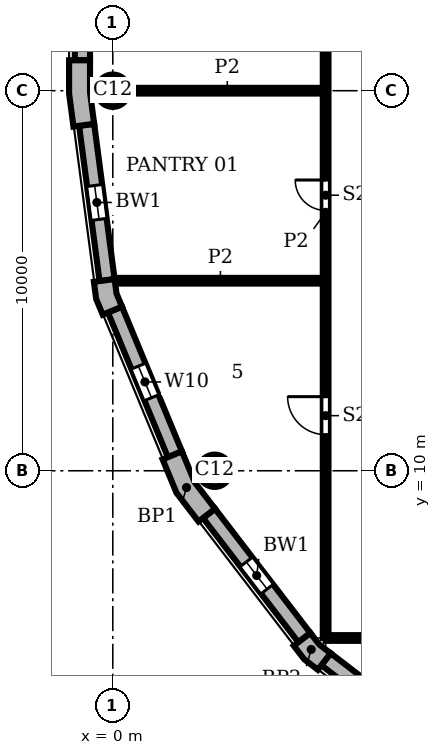
"""IFC4 building model, lengths in metres.
Left out: names, types, materials, properties, quantities, classifications, styles, units other than length and angle.
Written with IfcOpenShell. Run it as: python <this file> out.ifc"""

import sys

from ifc_helpers import new_model, si_unit, direction, frame, frame_2d, origin, origin_2d, place, context, subcontext, project, spatial, polyline, rectangle, circle, outline, extrude, element, fill, save


model = new_model("IFC4")
c1 = context("Model", 3, precision=1e-05, world=origin(), true_north=direction((0.0, 1.0)))
c2 = subcontext(c1, "Body", "Model", "MODEL_VIEW")
j1 = project(units=[si_unit("LENGTHUNIT", "METRE"), si_unit("PLANEANGLEUNIT", "RADIAN")], contexts=[c1])
p1 = place(None, origin())
s1 = spatial("IfcSite", under=j1, at=p1, CompositionType="ELEMENT")
p2 = place(p1, origin())
s2 = spatial("IfcBuilding", under=s1, at=p2, CompositionType="ELEMENT")
p3 = place(p2, frame((0.0, 0.0, 246.0)))
s3 = spatial("IfcBuildingStorey", under=s2, at=p3, CompositionType="ELEMENT", Elevation=246.0)
for number, where, z_axis, x_axis in (
    (1, (0.0, 20.0, 0.0), (0.0, 0.0, 1.0), (1.0, 0.0, 0.0)),
    (2, (2.679, 10.0, 0.0), (0.0, 0.0, 1.0), (1.0, 0.0, 0.0)),
):
    element("IfcColumn", number, at=place(p3, frame(where, z_axis=z_axis, x_axis=x_axis)), inside=s3, PredefinedType="COLUMN", context=c2, shape_type="SweptSolid", body=[
        extrude(circle(Radius=0.425, at=origin_2d()), origin(), (0.0, 0.0, 1.0), 5.4),
    ])
p4 = place(p3, origin())
e3 = element("IfcWall", 3, at=p4, inside=s3, PredefinedType="SOLIDWALL", context=c2, shape_type="SweptSolid", body=[
    extrude(outline(polyline([(-1.0, 20.8), (-1.15, 20.8), (-1.15, 19.925), (-1.036, 19.057), (-0.887, 19.076), (-0.49, 19.128), (-0.6, 19.961), (-0.6, 20.8), (-1.0, 20.8)])), origin(), (0.0, 0.0, 1.0), 5.4),
])
e4 = element("IfcWall", 4, at=p4, inside=s3, PredefinedType="SOLIDWALL", context=c2, shape_type="SweptSolid", body=[
    extrude(outline(polyline([(-0.349, 14.99), (-0.498, 14.971), (-0.439, 14.523), (-0.266, 14.106), (-0.128, 14.164), (0.242, 14.317), (0.097, 14.667), (0.047, 15.043), (-0.349, 14.99)])), origin(), (0.0, 0.0, 1.0), 5.4),
])
e5 = element("IfcWall", 5, at=p4, inside=s3, PredefinedType="SOLIDWALL", context=c2, shape_type="SweptSolid", body=[
    extrude(outline(polyline([(1.449, 10.356), (1.311, 10.299), (1.675, 9.42), (2.254, 8.665), (2.373, 8.757), (2.69, 9.0), (2.155, 9.698), (1.819, 10.51), (1.449, 10.356)])), origin(), (0.0, 0.0, 1.0), 5.4),
])
e6 = element("IfcWall", 6, at=p4, inside=s3, PredefinedType="SOLIDWALL", context=c2, shape_type="SweptSolid", body=[
    extrude(outline(polyline([(4.882, 5.487), (4.763, 5.396), (5.038, 5.038), (5.396, 4.763), (5.487, 4.882), (5.731, 5.199), (5.43, 5.43), (5.199, 5.731), (4.882, 5.487)])), origin(), (0.0, 0.0, 1.0), 5.4),
])
p5 = place(p3, frame((-0.8, 39.2, 0.0), z_axis=(0.0, 0.0, 1.0), x_axis=(0.0, -1.0, 0.0)))
e7 = element("IfcWall", 7, at=p5, inside=s3, PredefinedType="SOLIDWALL", context=c2, shape_type="SweptSolid", body=[
    extrude(rectangle(XDim=18.4, YDim=0.4, at=frame_2d((9.2, 0.0))), origin(), (0.0, 0.0, 1.0), 5.4),
])
p6 = place(p5, frame((3.75, 0.0, 0.9)))
e8 = element("IfcOpeningElement", 8, at=p6, cuts=e7, PredefinedType="OPENING", context=c2, shape_type="SweptSolid", body=[
    extrude(rectangle(XDim=0.9, YDim=3.4, at=frame_2d((0.45, 1.7))), frame((0.0, 0.21, 0.0), z_axis=(0.0, -1.0, 0.0), x_axis=(1.0, 0.0, 0.0)), (0.0, 0.0, 1.0), 0.42),
])
p7 = place(p5, frame((13.75, 0.0, 0.9)))
e9 = element("IfcOpeningElement", 9, at=p7, cuts=e7, PredefinedType="OPENING", context=c2, shape_type="SweptSolid", body=[
    extrude(rectangle(XDim=0.9, YDim=3.4, at=frame_2d((0.45, 1.7))), frame((0.0, 0.21, 0.0), z_axis=(0.0, -1.0, 0.0), x_axis=(1.0, 0.0, 0.0)), (0.0, 0.0, 1.0), 0.42),
])
p8 = place(p3, frame((-0.689, 19.102, 0.0), z_axis=(0.0, 0.0, 1.0), x_axis=(0.130514280502, -0.991446429508, 0.0)))
e10 = element("IfcWall", 10, at=p8, inside=s3, PredefinedType="SOLIDWALL", context=c2, shape_type="SweptSolid", body=[
    extrude(rectangle(XDim=4.121, YDim=0.4, at=frame_2d((2.061, 0.0))), origin(), (0.0, 0.0, 1.0), 5.4),
])
p9 = place(p8, frame((1.611, 0.0, 0.9)))
e11 = element("IfcOpeningElement", 11, at=p9, cuts=e10, PredefinedType="OPENING", context=c2, shape_type="SweptSolid", body=[
    extrude(rectangle(XDim=0.9, YDim=3.4, at=frame_2d((0.45, 1.7))), frame((0.0, 0.21, 0.0), z_axis=(0.0, -1.0, 0.0), x_axis=(1.0, 0.0, 0.0)), (0.0, 0.0, 1.0), 0.42),
])
p10 = place(p3, frame((0.057, 14.24, 0.0), z_axis=(0.0, 0.0, 1.0), x_axis=(0.382721546029, -0.923863744394, 0.0)))
e12 = element("IfcWall", 12, at=p10, inside=s3, PredefinedType="SOLIDWALL", context=c2, shape_type="SweptSolid", body=[
    extrude(rectangle(XDim=4.121, YDim=0.4, at=frame_2d((2.061, 0.0))), origin(), (0.0, 0.0, 1.0), 5.4),
])
p11 = place(p10, frame((1.611, 0.0, 0.9)))
e13 = element("IfcOpeningElement", 13, at=p11, cuts=e12, PredefinedType="OPENING", context=c2, shape_type="SweptSolid", body=[
    extrude(rectangle(XDim=0.9, YDim=3.4, at=frame_2d((0.45, 1.7))), frame((0.0, 0.21, 0.0), z_axis=(0.0, -1.0, 0.0), x_axis=(1.0, 0.0, 0.0)), (0.0, 0.0, 1.0), 0.42),
])
p12 = place(p3, frame((2.532, 8.878, 0.0), z_axis=(0.0, 0.0, 1.0), x_axis=(0.608759824817, -0.793354571229, 0.0)))
e14 = element("IfcWall", 14, at=p12, inside=s3, PredefinedType="SOLIDWALL", context=c2, shape_type="SweptSolid", body=[
    extrude(rectangle(XDim=4.121, YDim=0.4, at=frame_2d((2.061, 0.0))), origin(), (0.0, 0.0, 1.0), 5.4),
])
p13 = place(p12, frame((1.611, 0.0, 0.9)))
e15 = element("IfcOpeningElement", 15, at=p13, cuts=e14, PredefinedType="OPENING", context=c2, shape_type="SweptSolid", body=[
    extrude(rectangle(XDim=0.9, YDim=3.4, at=frame_2d((0.45, 1.7))), frame((0.0, 0.21, 0.0), z_axis=(0.0, -1.0, 0.0), x_axis=(1.0, 0.0, 0.0)), (0.0, 0.0, 1.0), 0.42),
])
p14 = place(p3, frame((5.609, 5.041, 0.0), z_axis=(0.0, 0.0, 1.0), x_axis=(0.793354571229, -0.608759824817, 0.0)))
e16 = element("IfcWall", 16, at=p14, inside=s3, PredefinedType="SOLIDWALL", context=c2, shape_type="SweptSolid", body=[
    extrude(rectangle(XDim=4.121, YDim=0.4, at=frame_2d((2.061, 0.0))), origin(), (0.0, 0.0, 1.0), 5.4),
])
p15 = place(p14, frame((1.611, 0.0, 0.9)))
e17 = element("IfcOpeningElement", 17, at=p15, cuts=e16, PredefinedType="OPENING", context=c2, shape_type="SweptSolid", body=[
    extrude(rectangle(XDim=0.9, YDim=3.4, at=frame_2d((0.45, 1.7))), frame((0.0, 0.21, 0.0), z_axis=(0.0, -1.0, 0.0), x_axis=(1.0, 0.0, 0.0)), (0.0, 0.0, 1.0), 0.42),
])
p16 = place(p3, frame((5.6, 5.6, 0.0), z_axis=(0.0, 0.0, 1.0), x_axis=(0.0, 1.0, 0.0)))
e18 = element("IfcWall", 18, at=p16, inside=s3, PredefinedType="PARTITIONING", context=c2, shape_type="SweptSolid", body=[
    extrude(rectangle(XDim=22.4, YDim=0.15, at=frame_2d((11.2, 0.0))), origin(), (0.0, 0.0, 1.0), 5.08),
])
p17 = place(p16, frame((5.35, 0.0, 0.0)))
e19 = element("IfcOpeningElement", 19, at=p17, cuts=e18, PredefinedType="OPENING", context=c2, shape_type="SweptSolid", body=[
    extrude(rectangle(XDim=1.0, YDim=2.1, at=frame_2d((0.5, 1.05))), frame((0.0, 0.085, 0.0), z_axis=(0.0, -1.0, 0.0), x_axis=(1.0, 0.0, 0.0)), (0.0, 0.0, 1.0), 0.17),
])
p18 = place(p16, frame((11.25, 0.0, 0.0)))
e20 = element("IfcOpeningElement", 20, at=p18, cuts=e18, PredefinedType="OPENING", context=c2, shape_type="SweptSolid", body=[
    extrude(rectangle(XDim=0.8, YDim=2.1, at=frame_2d((0.4, 1.05))), frame((0.0, 0.085, 0.0), z_axis=(0.0, -1.0, 0.0), x_axis=(1.0, 0.0, 0.0)), (0.0, 0.0, 1.0), 0.17),
])
p19 = place(p16, frame((18.25, 0.0, 0.0)))
e21 = element("IfcOpeningElement", 21, at=p19, cuts=e18, PredefinedType="OPENING", context=c2, shape_type="SweptSolid", body=[
    extrude(rectangle(XDim=1.8, YDim=2.1, at=frame_2d((0.9, 1.05))), frame((0.0, 0.085, 0.0), z_axis=(0.0, -1.0, 0.0), x_axis=(1.0, 0.0, 0.0)), (0.0, 0.0, 1.0), 0.17),
])
p20 = place(p3, frame((5.6, 5.6, 0.0), z_axis=(0.0, 0.0, 1.0), x_axis=(1.0, 0.0, 0.0)))
e22 = element("IfcWall", 22, at=p20, inside=s3, PredefinedType="PARTITIONING", context=c2, shape_type="SweptSolid", body=[
    extrude(rectangle(XDim=25.4, YDim=0.15, at=frame_2d((12.7, 0.0))), origin(), (0.0, 0.0, 1.0), 5.08),
])
p21 = place(p20, frame((3.6, 0.0, 0.0)))
e23 = element("IfcOpeningElement", 23, at=p21, cuts=e22, PredefinedType="OPENING", context=c2, shape_type="SweptSolid", body=[
    extrude(rectangle(XDim=1.0, YDim=2.1, at=frame_2d((0.5, 1.05))), frame((0.0, 0.085, 0.0), z_axis=(0.0, -1.0, 0.0), x_axis=(1.0, 0.0, 0.0)), (0.0, 0.0, 1.0), 0.17),
])
p22 = place(p20, frame((11.25, 0.0, 0.0)))
e24 = element("IfcOpeningElement", 24, at=p22, cuts=e22, PredefinedType="OPENING", context=c2, shape_type="SweptSolid", body=[
    extrude(rectangle(XDim=0.8, YDim=2.1, at=frame_2d((0.4, 1.05))), frame((0.0, 0.085, 0.0), z_axis=(0.0, -1.0, 0.0), x_axis=(1.0, 0.0, 0.0)), (0.0, 0.0, 1.0), 0.17),
])
p23 = place(p20, frame((18.25, 0.0, 0.0)))
e25 = element("IfcOpeningElement", 25, at=p23, cuts=e22, PredefinedType="OPENING", context=c2, shape_type="SweptSolid", body=[
    extrude(rectangle(XDim=1.0, YDim=2.1, at=frame_2d((0.5, 1.05))), frame((0.0, 0.085, 0.0), z_axis=(0.0, -1.0, 0.0), x_axis=(1.0, 0.0, 0.0)), (0.0, 0.0, 1.0), 0.17),
])
p24 = place(p3, frame((0.063, 15.0, 0.0), z_axis=(0.0, 0.0, 1.0), x_axis=(1.0, 0.0, 0.0)))
e26 = element("IfcWall", 26, at=p24, inside=s3, PredefinedType="PARTITIONING", context=c2, shape_type="SweptSolid", body=[
    extrude(rectangle(XDim=5.537, YDim=0.15, at=frame_2d((2.769, 0.0))), origin(), (0.0, 0.0, 1.0), 5.08),
])
p25 = place(p3, frame((0.425, 20.0, 0.0), z_axis=(0.0, 0.0, 1.0), x_axis=(1.0, 0.0, 0.0)))
e27 = element("IfcWall", 27, at=p25, inside=s3, PredefinedType="PARTITIONING", context=c2, shape_type="SweptSolid", body=[
    extrude(rectangle(XDim=5.175, YDim=0.15, at=frame_2d((2.587, 0.0))), origin(), (0.0, 0.0, 1.0), 5.08),
])
p26 = place(p9, origin())
e28 = element("IfcWindow", 28, at=p26, inside=s3, PartitioningType="SINGLE_PANEL", PredefinedType="WINDOW", context=c2, shape_type="SweptSolid", body=[
    extrude(rectangle(XDim=0.9, YDim=3.4, at=frame_2d((0.45, 1.7))), frame((0.0, 0.16, 0.0), z_axis=(0.0, -1.0, 0.0), x_axis=(1.0, 0.0, 0.0)), (0.0, 0.0, 1.0), 0.06),
])
fill(e11, e28)
p27 = place(p11, origin())
e29 = element("IfcWindow", 29, at=p27, inside=s3, PartitioningType="SINGLE_PANEL", PredefinedType="WINDOW", context=c2, shape_type="SweptSolid", body=[
    extrude(rectangle(XDim=0.9, YDim=3.4, at=frame_2d((0.45, 1.7))), frame((0.0, 0.16, 0.0), z_axis=(0.0, -1.0, 0.0), x_axis=(1.0, 0.0, 0.0)), (0.0, 0.0, 1.0), 0.06),
])
fill(e13, e29)
p28 = place(p13, origin())
e30 = element("IfcWindow", 30, at=p28, inside=s3, PartitioningType="SINGLE_PANEL", PredefinedType="WINDOW", context=c2, shape_type="SweptSolid", body=[
    extrude(rectangle(XDim=0.9, YDim=3.4, at=frame_2d((0.45, 1.7))), frame((0.0, 0.16, 0.0), z_axis=(0.0, -1.0, 0.0), x_axis=(1.0, 0.0, 0.0)), (0.0, 0.0, 1.0), 0.06),
])
fill(e15, e30)
p29 = place(p17, origin())
e31 = element("IfcDoor", 31, at=p29, inside=s3, OperationType="SINGLE_SWING_RIGHT", PredefinedType="DOOR", context=c2, shape_type="SweptSolid", body=[
    extrude(rectangle(XDim=1.0, YDim=2.1, at=frame_2d((0.5, 1.05))), frame((0.0, 0.025, 0.0), z_axis=(0.0, -1.0, 0.0), x_axis=(1.0, 0.0, 0.0)), (0.0, 0.0, 1.0), 0.05),
])
fill(e19, e31)
p30 = place(p18, origin())
e32 = element("IfcDoor", 32, at=p30, inside=s3, OperationType="SINGLE_SWING_RIGHT", PredefinedType="DOOR", context=c2, shape_type="SweptSolid", body=[
    extrude(rectangle(XDim=0.8, YDim=2.1, at=frame_2d((0.4, 1.05))), frame((0.0, 0.025, 0.0), z_axis=(0.0, -1.0, 0.0), x_axis=(1.0, 0.0, 0.0)), (0.0, 0.0, 1.0), 0.05),
])
fill(e20, e32)
save(model, sys.argv[1])
